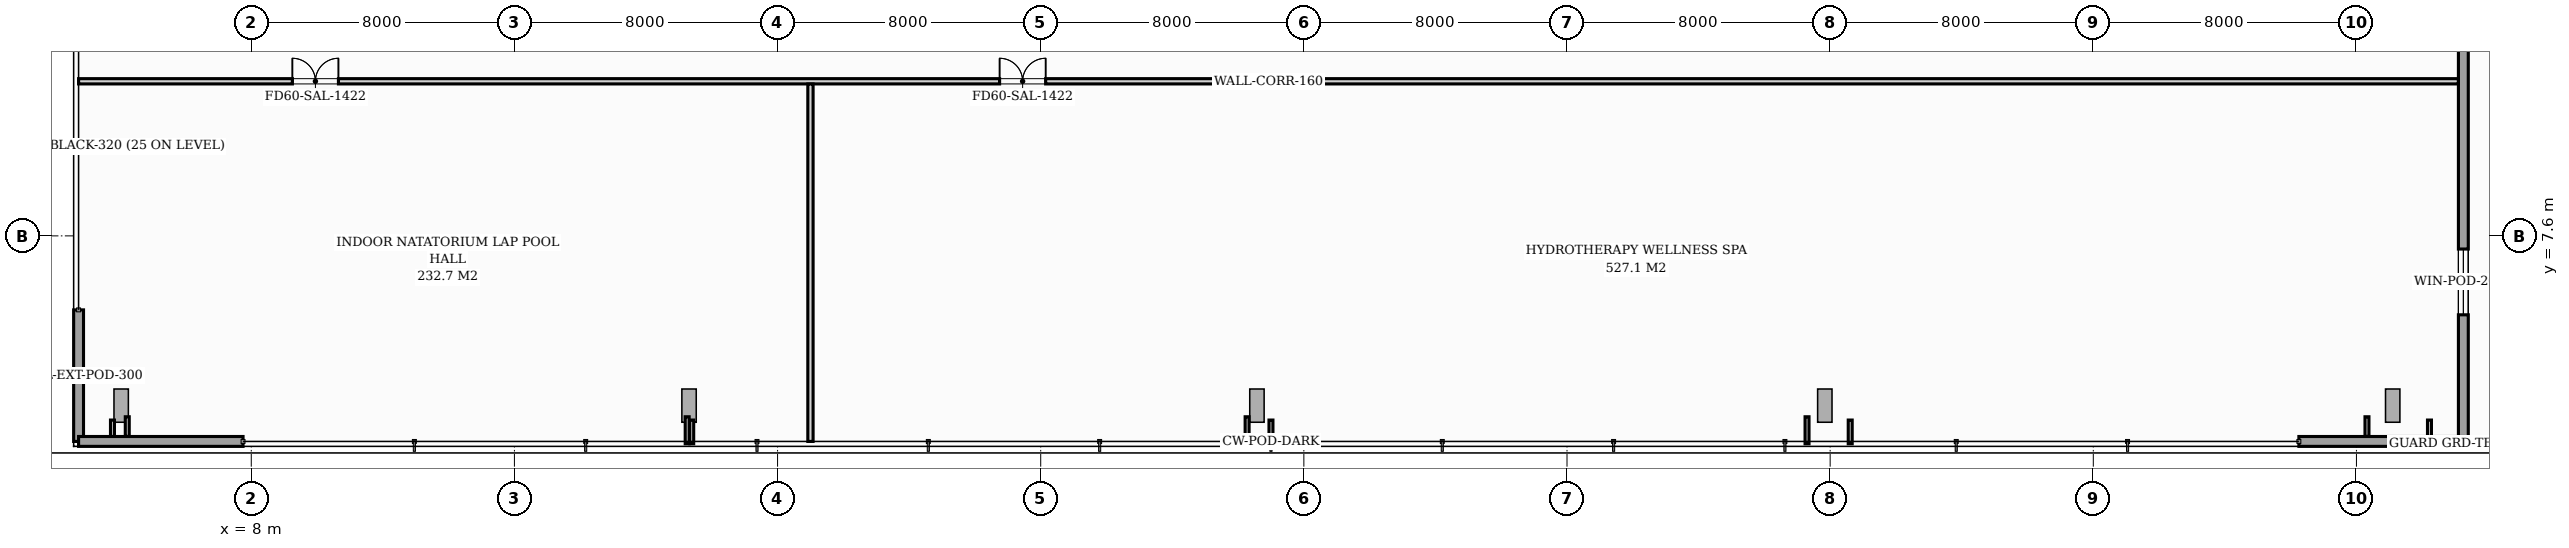
"""IFC4 building model, lengths in metres.
Left out: names, types, materials, properties, quantities, classifications, styles, units other than length and angle.
Written with IfcOpenShell. Run it as: python <this file> out.ifc"""

import sys

from ifc_helpers import new_model, si_unit, direction, frame, frame_2d, origin, origin_2d, place, context, subcontext, project, spatial, rectangle, i_section, extrude, source, transform, mapped, element, fill, save


model = new_model("IFC4")
c1 = context("Model", 3, precision=1e-05, world=origin(), true_north=direction((0.0, 1.0)))
c2 = subcontext(c1, "Body", "Model", "MODEL_VIEW")
j1 = project(units=[si_unit("LENGTHUNIT", "METRE"), si_unit("PLANEANGLEUNIT", "RADIAN")], contexts=[c1])
p1 = place(None, origin())
s1 = spatial("IfcSite", under=j1, at=p1, CompositionType="ELEMENT")
p2 = place(p1, origin())
s2 = spatial("IfcBuilding", under=s1, at=p2, CompositionType="ELEMENT")
p3 = place(p2, frame((0.0, 0.0, 9.5)))
s3 = spatial("IfcBuildingStorey", under=s2, at=p3, CompositionType="ELEMENT", Elevation=9.5)
m1 = source(origin(), c2, "Body", "SweptSolid", [
    extrude(i_section(OverallWidth=0.438, OverallDepth=1.011, WebThickness=0.041, FlangeThickness=0.074, FilletRadius=0.024, at=origin_2d()), origin(), (0.0, 0.0, 1.0), 4.059),
])
p4 = place(p3, frame((3.793, 2.383, 0.06), z_axis=(0.215192579614, 0.047753747404, 0.975403369529), x_axis=(-0.952238726602, -0.211312897966, 0.220427463606)))
e1 = element("IfcColumn", 1, at=p4, inside=s3, PredefinedType="COLUMN", context=c2, shape_type="MappedRepresentation", body=[
    mapped(m1, transform((0.0, 0.0, 0.0), scale=1.0)),
])
m2 = source(origin(), c2, "Body", "SweptSolid", [
    extrude(i_section(OverallWidth=0.438, OverallDepth=1.011, WebThickness=0.041, FlangeThickness=0.074, FilletRadius=0.024, at=origin_2d()), origin(), (0.0, 0.0, 1.0), 4.033),
])
p5 = place(p3, frame((21.388, 2.382, 0.03), z_axis=(-0.067186821929, 0.048846635402, 0.996543996605), x_axis=(0.806035283511, -0.58600943585, 0.083066616826)))
e2 = element("IfcColumn", 2, at=p5, inside=s3, PredefinedType="COLUMN", context=c2, shape_type="MappedRepresentation", body=[
    mapped(m2, transform((0.0, 0.0, 0.0), scale=1.0)),
])
m3 = source(origin(), c2, "Body", "SweptSolid", [
    extrude(i_section(OverallWidth=0.438, OverallDepth=1.011, WebThickness=0.041, FlangeThickness=0.074, FilletRadius=0.024, at=origin_2d()), origin(), (0.0, 0.0, 1.0), 4.152),
])
p6 = place(p3, frame((38.969, 2.384, 0.086), z_axis=(-0.334492314954, 0.046096321836, 0.941270428915), x_axis=(0.932457669002, -0.128501812708, 0.337653638586)))
e3 = element("IfcColumn", 3, at=p6, inside=s3, PredefinedType="COLUMN", context=c2, shape_type="MappedRepresentation", body=[
    mapped(m3, transform((0.0, 0.0, 0.0), scale=1.0)),
])
m4 = source(origin(), c2, "Body", "SweptSolid", [
    extrude(i_section(OverallWidth=0.438, OverallDepth=1.011, WebThickness=0.041, FlangeThickness=0.074, FilletRadius=0.024, at=origin_2d()), origin(), (0.0, 0.0, 1.0), 4.545),
])
p7 = place(p3, frame((56.526, 2.386, 0.131), z_axis=(-0.54058191129, 0.041149333603, 0.840284433707), x_axis=(0.837860523213, -0.063778312708, 0.542145801856)))
e4 = element("IfcColumn", 4, at=p7, inside=s3, PredefinedType="COLUMN", context=c2, shape_type="MappedRepresentation", body=[
    mapped(m4, transform((0.0, 0.0, 0.0), scale=1.0)),
])
m5 = source(origin(), c2, "Body", "SweptSolid", [
    extrude(i_section(OverallWidth=0.438, OverallDepth=1.011, WebThickness=0.041, FlangeThickness=0.074, FilletRadius=0.024, at=origin_2d()), origin(), (0.0, 0.0, 1.0), 5.138),
])
p8 = place(p3, frame((74.07, 2.388, 0.161), z_axis=(-0.681119746159, 0.035825900844, 0.731295013124), x_axis=(0.730285504781, -0.038411947723, 0.682061290339)))
e5 = element("IfcColumn", 5, at=p8, inside=s3, PredefinedType="COLUMN", context=c2, shape_type="MappedRepresentation", body=[
    mapped(m5, transform((0.0, 0.0, 0.0), scale=1.0)),
])
p9 = place(p3, frame((2.75, 1.35, 0.0), z_axis=(0.0, 0.0, 1.0), x_axis=(0.0, 1.0, 0.0)))
e6 = element("IfcWall", 6, at=p9, inside=s3, PredefinedType="STANDARD", context=c2, shape_type="SweptSolid", body=[
    extrude(rectangle(XDim=4.0, YDim=0.3, at=frame_2d((2.0, 0.0))), origin(), (0.0, 0.0, 1.0), 4.08),
])
p10 = place(p3, frame((75.25, 34.25, 0.0), z_axis=(0.0, 0.0, 1.0), x_axis=(0.0, -1.0, 0.0)))
e7 = element("IfcWall", 7, at=p10, inside=s3, PredefinedType="STANDARD", context=c2, shape_type="SweptSolid", body=[
    extrude(rectangle(XDim=32.9, YDim=0.3, at=frame_2d((16.45, 0.0))), origin(), (0.0, 0.0, 1.0), 4.08),
])
p11 = place(p10, frame((9.25, 0.0, 0.0)))
e8 = element("IfcOpeningElement", 8, at=p11, cuts=e7, PredefinedType="OPENING", context=c2, shape_type="SweptSolid", body=[
    extrude(rectangle(XDim=1.6, YDim=2.1, at=frame_2d((0.8, 1.05))), frame((0.0, 0.16, 0.0), z_axis=(0.0, -1.0, 0.0), x_axis=(1.0, 0.0, 0.0)), (0.0, 0.0, 1.0), 0.32),
])
p12 = place(p10, frame((27.05, 0.0, 0.9)))
e9 = element("IfcOpeningElement", 9, at=p12, cuts=e7, PredefinedType="OPENING", context=c2, shape_type="SweptSolid", body=[
    extrude(rectangle(XDim=2.0, YDim=2.4, at=frame_2d((1.0, 1.2))), frame((0.0, 0.16, 0.0), z_axis=(0.0, -1.0, 0.0), x_axis=(1.0, 0.0, 0.0)), (0.0, 0.0, 1.0), 0.32),
])
for number, where, z_axis, x_axis in (
    (10, (75.25, 1.35, 0.0), (0.0, 0.0, 1.0), (-1.0, 0.0, 0.0)),
    (11, (7.75, 1.35, 0.0), (0.0, 0.0, 1.0), (-1.0, 0.0, 0.0)),
):
    element("IfcWall", number, at=place(p3, frame(where, z_axis=z_axis, x_axis=x_axis)), inside=s3, PredefinedType="STANDARD", context=c2, shape_type="SweptSolid", body=[
        extrude(rectangle(XDim=5.0, YDim=0.3, at=frame_2d((2.5, 0.0))), origin(), (0.0, 0.0, 1.0), 4.08),
    ])
p13 = place(p3, frame((2.75, 12.3, 0.0), z_axis=(0.0, 0.0, 1.0), x_axis=(1.0, 0.0, 0.0)))
e12 = element("IfcWall", 12, at=p13, inside=s3, PredefinedType="PARTITIONING", context=c2, shape_type="SweptSolid", body=[
    extrude(rectangle(XDim=72.348, YDim=0.16, at=frame_2d((36.174, 0.0))), origin(), (0.0, 0.0, 1.0), 4.08),
])
p14 = place(p13, frame((6.5, 0.0, 0.0)))
e13 = element("IfcOpeningElement", 13, at=p14, cuts=e12, PredefinedType="OPENING", context=c2, shape_type="SweptSolid", body=[
    extrude(rectangle(XDim=1.4, YDim=2.08, at=frame_2d((0.7, 1.04))), frame((0.0, 0.09, 0.0), z_axis=(0.0, -1.0, 0.0), x_axis=(1.0, 0.0, 0.0)), (0.0, 0.0, 1.0), 0.18),
])
p15 = place(p13, frame((28.0, 0.0, 0.0)))
e14 = element("IfcOpeningElement", 14, at=p15, cuts=e12, PredefinedType="OPENING", context=c2, shape_type="SweptSolid", body=[
    extrude(rectangle(XDim=1.4, YDim=2.08, at=frame_2d((0.7, 1.04))), frame((0.0, 0.09, 0.0), z_axis=(0.0, -1.0, 0.0), x_axis=(1.0, 0.0, 0.0)), (0.0, 0.0, 1.0), 0.18),
])
p16 = place(p3, frame((25.0, 1.35, 0.0), z_axis=(0.0, 0.0, 1.0), x_axis=(0.0, 1.0, 0.0)))
e15 = element("IfcWall", 15, at=p16, inside=s3, PredefinedType="PARTITIONING", context=c2, shape_type="SweptSolid", body=[
    extrude(rectangle(XDim=10.868, YDim=0.16, at=frame_2d((5.434, 0.0))), origin(), (0.0, 0.0, 1.0), 4.08),
])
p17 = place(p3, frame((4.23, 2.1, 0.0), z_axis=(0.0, 0.0, 1.0), x_axis=(0.0, -1.0, 0.0)))
e16 = element("IfcWall", 16, at=p17, inside=s3, PredefinedType="PARTITIONING", context=c2, shape_type="SweptSolid", body=[
    extrude(rectangle(XDim=0.598, YDim=0.12, at=frame_2d((0.299, 0.0))), origin(), (0.0, 0.0, 1.0), 4.08),
])
for number, where, z_axis, x_axis in (
    (17, (21.252, 2.1, 0.0), (0.0, 0.0, 1.0), (0.0, -1.0, 0.0)),
    (18, (38.275, 2.1, 0.0), (0.0, 0.0, 1.0), (0.0, -1.0, 0.0)),
    (19, (55.298, 2.1, 0.0), (0.0, 0.0, 1.0), (0.0, -1.0, 0.0)),
):
    element("IfcWall", number, at=place(p3, frame(where, z_axis=z_axis, x_axis=x_axis)), inside=s3, PredefinedType="PARTITIONING", context=c2, shape_type="SweptSolid", body=[
        extrude(rectangle(XDim=0.82, YDim=0.12, at=frame_2d((0.41, 0.0))), origin(), (0.0, 0.0, 1.0), 4.08),
    ])
p18 = place(p3, frame((72.32, 2.1, 0.0), z_axis=(0.0, 0.0, 1.0), x_axis=(0.0, -1.0, 0.0)))
e20 = element("IfcWall", 20, at=p18, inside=s3, PredefinedType="PARTITIONING", context=c2, shape_type="SweptSolid", body=[
    extrude(rectangle(XDim=0.598, YDim=0.12, at=frame_2d((0.299, 0.0))), origin(), (0.0, 0.0, 1.0), 4.08),
])
p19 = place(p3, frame((3.78, 2.0, 0.0), z_axis=(0.0, 0.0, 1.0), x_axis=(0.0, -1.0, 0.0)))
e21 = element("IfcWall", 21, at=p19, inside=s3, PredefinedType="PARTITIONING", context=c2, shape_type="SweptSolid", body=[
    extrude(rectangle(XDim=0.498, YDim=0.12, at=frame_2d((0.249, 0.0))), origin(), (0.0, 0.0, 1.0), 4.08),
])
for number, where, z_axis, x_axis in (
    (22, (21.39, 2.0, 0.0), (0.0, 0.0, 1.0), (0.0, -1.0, 0.0)),
    (23, (39.0, 2.0, 0.0), (0.0, 0.0, 1.0), (0.0, -1.0, 0.0)),
    (24, (56.61, 2.0, 0.0), (0.0, 0.0, 1.0), (0.0, -1.0, 0.0)),
):
    element("IfcWall", number, at=place(p3, frame(where, z_axis=z_axis, x_axis=x_axis)), inside=s3, PredefinedType="PARTITIONING", context=c2, shape_type="SweptSolid", body=[
        extrude(rectangle(XDim=0.72, YDim=0.12, at=frame_2d((0.36, 0.0))), origin(), (0.0, 0.0, 1.0), 4.08),
    ])
p20 = place(p3, frame((74.22, 2.0, 0.0), z_axis=(0.0, 0.0, 1.0), x_axis=(0.0, -1.0, 0.0)))
e25 = element("IfcWall", 25, at=p20, inside=s3, PredefinedType="PARTITIONING", context=c2, shape_type="SweptSolid", body=[
    extrude(rectangle(XDim=0.498, YDim=0.12, at=frame_2d((0.249, 0.0))), origin(), (0.0, 0.0, 1.0), 4.08),
])
m6 = source(origin(), c2, "Body", "SweptSolid", [
    extrude(rectangle(XDim=2.0, YDim=2.4, at=frame_2d((1.0, 1.2))), frame((0.0, 0.03, 0.0), z_axis=(0.0, -1.0, 0.0), x_axis=(1.0, 0.0, 0.0)), (0.0, 0.0, 1.0), 0.06),
])
p21 = place(p12, origin())
e26 = element("IfcWindow", 26, at=p21, inside=s3, PartitioningType="SINGLE_PANEL", PredefinedType="WINDOW", context=c2, shape_type="MappedRepresentation", body=[
    mapped(m6, transform((0.0, 0.0, 0.0), scale=1.0)),
])
fill(e9, e26)
m7 = source(origin(), c2, "Body", "SweptSolid", [
    extrude(rectangle(XDim=1.4, YDim=2.08, at=frame_2d((0.7, 1.04))), frame((0.0, 0.025, 0.0), z_axis=(0.0, -1.0, 0.0), x_axis=(1.0, 0.0, 0.0)), (0.0, 0.0, 1.0), 0.05),
])
p22 = place(p14, origin())
e27 = element("IfcDoor", 27, at=p22, inside=s3, OperationType="DOUBLE_DOOR_SINGLE_SWING", PredefinedType="DOOR", context=c2, shape_type="MappedRepresentation", body=[
    mapped(m7, transform((0.0, 0.0, 0.0), scale=1.0)),
])
fill(e13, e27)
p23 = place(p15, origin())
e28 = element("IfcDoor", 28, at=p23, inside=s3, OperationType="DOUBLE_DOOR_SINGLE_SWING", PredefinedType="DOOR", context=c2, shape_type="MappedRepresentation", body=[
    mapped(m7, transform((0.0, 0.0, 0.0), scale=1.0)),
])
fill(e14, e28)
save(model, sys.argv[1])
